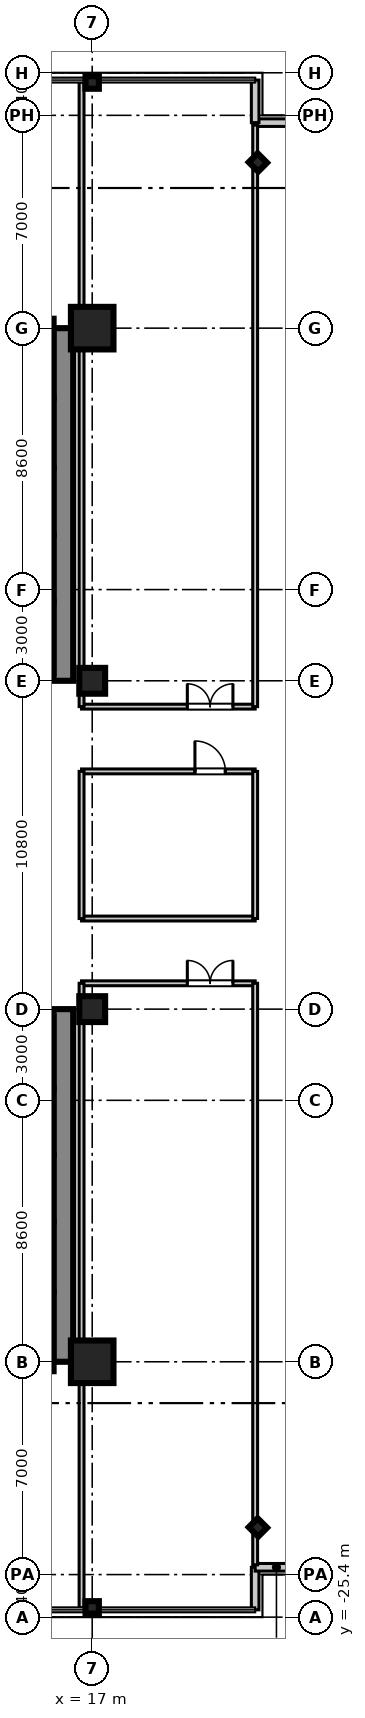
"""IFC4 building model, lengths in metres.
Left out: names, types, materials, properties, quantities, classifications, styles, units other than length and angle.
Written with IfcOpenShell. Run it as: python <this file> out.ifc"""

import sys

from ifc_helpers import new_model, si_unit, direction, frame, frame_2d, origin, origin_2d, place, context, subcontext, project, spatial, rectangle, i_section, extrude, source, transform, mapped, element, fill, save


model = new_model("IFC4")
c1 = context("Model", 3, precision=1e-05, world=origin(), true_north=direction((0.0, 1.0)))
c2 = subcontext(c1, "Body", "Model", "MODEL_VIEW")
j1 = project(units=[si_unit("LENGTHUNIT", "METRE"), si_unit("PLANEANGLEUNIT", "RADIAN")], contexts=[c1])
p1 = place(None, origin())
s1 = spatial("IfcSite", under=j1, at=p1, CompositionType="ELEMENT")
p2 = place(p1, origin())
s2 = spatial("IfcBuilding", under=s1, at=p2, CompositionType="ELEMENT")
p3 = place(p2, frame((0.0, 0.0, 32.4)))
s3 = spatial("IfcBuildingStorey", under=s2, at=p3, CompositionType="ELEMENT", Elevation=32.4)
m1 = source(origin(), c2, "Body", "SweptSolid", [
    extrude(rectangle(XDim=1.4, YDim=1.4, at=origin_2d()), origin(), (0.0, 0.0, 1.0), 3.605),
])
p4 = place(p3, frame((17.0, -17.0, 0.0), z_axis=(0.0, 0.0, 1.0), x_axis=(1.0, 0.0, 0.0)))
e1 = element("IfcColumn", 1, at=p4, inside=s3, PredefinedType="COLUMN", context=c2, shape_type="MappedRepresentation", body=[
    mapped(m1, transform((0.0, 0.0, 0.0), scale=1.0)),
])
m2 = source(origin(), c2, "Body", "SweptSolid", [
    extrude(rectangle(XDim=0.85, YDim=0.85, at=origin_2d()), origin(), (0.0, 0.0, 1.0), 3.605),
])
for number, where, z_axis, x_axis in (
    (2, (17.0, -5.4, 0.0), (0.0, 0.0, 1.0), (1.0, 0.0, 0.0)),
    (3, (17.0, 5.4, 0.0), (0.0, 0.0, 1.0), (1.0, 0.0, 0.0)),
):
    element("IfcColumn", number, at=place(p3, frame(where, z_axis=z_axis, x_axis=x_axis)), inside=s3, PredefinedType="PILASTER", context=c2, shape_type="MappedRepresentation", body=[
        mapped(m2, transform((0.0, 0.0, 0.0), scale=1.0)),
    ])
p5 = place(p3, frame((17.0, 17.0, 0.0), z_axis=(0.0, 0.0, 1.0), x_axis=(1.0, 0.0, 0.0)))
e4 = element("IfcColumn", 4, at=p5, inside=s3, PredefinedType="COLUMN", context=c2, shape_type="MappedRepresentation", body=[
    mapped(m1, transform((0.0, 0.0, 0.0), scale=1.0)),
])
m3 = source(origin(), c2, "Body", "SweptSolid", [
    extrude(i_section(OverallWidth=0.412, OverallDepth=0.438, WebThickness=0.023, FlangeThickness=0.036, at=origin_2d()), origin(), (0.0, 0.0, 1.0), 3.605),
])
for number, where, z_axis, x_axis in (
    (5, (17.0, -25.08, 0.0), (0.0, 0.0, 1.0), (0.0, 1.0, 0.0)),
    (6, (17.0, 25.08, 0.0), (0.0, 0.0, 1.0), (0.0, 1.0, 0.0)),
    (7, (22.45, -22.45, 0.0), (0.0, 0.0, 1.0), (0.707, 0.707, 0.0)),
    (8, (22.45, 22.45, 0.0), (0.0, 0.0, 1.0), (0.707, 0.707, 0.0)),
):
    element("IfcColumn", number, at=place(p3, frame(where, z_axis=z_axis, x_axis=x_axis)), inside=s3, PredefinedType="COLUMN", context=c2, shape_type="MappedRepresentation", body=[
        mapped(m3, transform((0.0, 0.0, 0.0), scale=1.0)),
    ])
m4 = source(origin(), c2, "Body", "SweptSolid", [
    extrude(rectangle(XDim=11.6, YDim=0.65, at=frame_2d((5.8, 0.0))), origin(), (0.0, 0.0, 1.0), 3.37),
])
for number, where, z_axis, x_axis in (
    (9, (16.05, 5.4, 0.0), (0.0, 0.0, 1.0), (0.0, 1.0, 0.0)),
    (10, (16.05, -17.0, 0.0), (0.0, 0.0, 1.0), (0.0, 1.0, 0.0)),
):
    element("IfcWall", number, at=place(p3, frame(where, z_axis=z_axis, x_axis=x_axis)), inside=s3, PredefinedType="SHEAR", context=c2, shape_type="MappedRepresentation", body=[
        mapped(m4, transform((0.0, 0.0, 0.0), scale=1.0)),
    ])
m5 = source(origin(), c2, "Body", "SweptSolid", [
    extrude(rectangle(XDim=2.36, YDim=0.22, at=frame_2d((1.18, 0.0))), origin(), (0.0, 0.0, 1.0), 3.37),
])
p6 = place(p3, frame((15.62, 5.64, 0.0), z_axis=(0.0, 0.0, 1.0), x_axis=(0.0, 1.0, 0.0)))
e11 = element("IfcWall", 11, at=p6, inside=s3, PredefinedType="SHEAR", context=c2, shape_type="MappedRepresentation", body=[
    mapped(m5, transform((0.0, 0.0, 0.0), scale=1.0)),
])
m6 = source(origin(), c2, "Body", "SweptSolid", [
    extrude(rectangle(XDim=2.2, YDim=0.22, at=frame_2d((1.1, 0.0))), origin(), (0.0, 0.0, 1.0), 3.37),
])
for number, where, z_axis, x_axis in (
    (12, (15.62, 8.0, 0.0), (0.0, 0.0, 1.0), (0.0, 1.0, 0.0)),
    (13, (15.62, 10.2, 0.0), (0.0, 0.0, 1.0), (0.0, 1.0, 0.0)),
):
    element("IfcWall", number, at=place(p3, frame(where, z_axis=z_axis, x_axis=x_axis)), inside=s3, PredefinedType="SHEAR", context=c2, shape_type="MappedRepresentation", body=[
        mapped(m6, transform((0.0, 0.0, 0.0), scale=1.0)),
    ])
m7 = source(origin(), c2, "Body", "SweptSolid", [
    extrude(rectangle(XDim=2.3, YDim=0.22, at=frame_2d((1.15, 0.0))), origin(), (0.0, 0.0, 1.0), 3.37),
])
p7 = place(p3, frame((15.62, 12.4, 0.0), z_axis=(0.0, 0.0, 1.0), x_axis=(0.0, 1.0, 0.0)))
e14 = element("IfcWall", 14, at=p7, inside=s3, PredefinedType="SHEAR", context=c2, shape_type="MappedRepresentation", body=[
    mapped(m7, transform((0.0, 0.0, 0.0), scale=1.0)),
])
p8 = place(p3, frame((15.62, -8.0, 0.0), z_axis=(0.0, 0.0, 1.0), x_axis=(0.0, 1.0, 0.0)))
e15 = element("IfcWall", 15, at=p8, inside=s3, PredefinedType="SHEAR", context=c2, shape_type="MappedRepresentation", body=[
    mapped(m5, transform((0.0, 0.0, 0.0), scale=1.0)),
])
for number, where, z_axis, x_axis in (
    (16, (15.62, -10.2, 0.0), (0.0, 0.0, 1.0), (0.0, 1.0, 0.0)),
    (17, (15.62, -12.4, 0.0), (0.0, 0.0, 1.0), (0.0, 1.0, 0.0)),
):
    element("IfcWall", number, at=place(p3, frame(where, z_axis=z_axis, x_axis=x_axis)), inside=s3, PredefinedType="SHEAR", context=c2, shape_type="MappedRepresentation", body=[
        mapped(m6, transform((0.0, 0.0, 0.0), scale=1.0)),
    ])
p9 = place(p3, frame((15.62, -14.7, 0.0), z_axis=(0.0, 0.0, 1.0), x_axis=(0.0, 1.0, 0.0)))
e18 = element("IfcWall", 18, at=p9, inside=s3, PredefinedType="SHEAR", context=c2, shape_type="MappedRepresentation", body=[
    mapped(m7, transform((0.0, 0.0, 0.0), scale=1.0)),
])
m8 = source(origin(), c2, "Body", "SweptSolid", [
    extrude(rectangle(XDim=2.61, YDim=0.22, at=frame_2d((1.305, 0.0))), origin(), (0.0, 0.0, 1.0), 3.37),
])
for number, where, z_axis, x_axis in (
    (19, (15.62, 14.7, 0.0), (0.0, 0.0, 1.0), (0.0, 1.0, 0.0)),
    (20, (15.62, -17.31, 0.0), (0.0, 0.0, 1.0), (0.0, 1.0, 0.0)),
):
    element("IfcWall", number, at=place(p3, frame(where, z_axis=z_axis, x_axis=x_axis)), inside=s3, PredefinedType="SHEAR", context=c2, shape_type="MappedRepresentation", body=[
        mapped(m8, transform((0.0, 0.0, 0.0), scale=1.0)),
    ])
m9 = source(origin(), c2, "Body", "SweptSolid", [
    extrude(rectangle(XDim=1.4, YDim=0.25, at=frame_2d((0.7, 0.0))), origin(), (0.0, 0.0, 1.0), 3.37),
])
for number, where, z_axis, x_axis in (
    (21, (22.36, -25.16, 0.0), (0.0, 0.0, 1.0), (0.0, 1.0, 0.0)),
    (22, (22.36, -23.76, 0.0), (0.0, 0.0, 1.0), (1.0, 0.0, 0.0)),
    (23, (22.36, 23.76, 0.0), (0.0, 0.0, 1.0), (1.0, 0.0, 0.0)),
    (24, (22.36, 23.76, 0.0), (0.0, 0.0, 1.0), (0.0, 1.0, 0.0)),
):
    element("IfcWall", number, at=place(p3, frame(where, z_axis=z_axis, x_axis=x_axis)), inside=s3, PredefinedType="STANDARD", context=c2, shape_type="MappedRepresentation", body=[
        mapped(m9, transform((0.0, 0.0, 0.0), scale=1.0)),
    ])
m10 = source(origin(), c2, "Body", "SweptSolid", [
    extrude(rectangle(XDim=5.71, YDim=0.16, at=frame_2d((2.855, 0.0))), origin(), (0.0, 0.0, 1.0), 2.71),
])
p10 = place(p3, frame((16.65, 4.55, 0.0), z_axis=(0.0, 0.0, 1.0), x_axis=(1.0, 0.0, 0.0)))
e25 = element("IfcWall", 25, at=p10, inside=s3, PredefinedType="PARTITIONING", context=c2, shape_type="MappedRepresentation", body=[
    mapped(m10, transform((0.0, 0.0, 0.0), scale=1.0)),
])
p11 = place(p10, frame((3.479, 0.0, 0.0)))
e26 = element("IfcOpeningElement", 26, at=p11, cuts=e25, PredefinedType="OPENING", context=c2, shape_type="SweptSolid", body=[
    extrude(rectangle(XDim=1.5, YDim=2.15, at=frame_2d((0.75, 1.075))), frame((0.0, 0.09, 0.0), z_axis=(0.0, -1.0, 0.0), x_axis=(1.0, 0.0, 0.0)), (0.0, 0.0, 1.0), 0.18),
])
m11 = source(origin(), c2, "Body", "SweptSolid", [
    extrude(rectangle(XDim=20.55, YDim=0.16, at=frame_2d((10.275, 0.0))), origin(), (0.0, 0.0, 1.0), 2.71),
])
p12 = place(p3, frame((16.65, 4.55, 0.0), z_axis=(0.0, 0.0, 1.0), x_axis=(0.0, 1.0, 0.0)))
e27 = element("IfcWall", 27, at=p12, inside=s3, PredefinedType="PARTITIONING", context=c2, shape_type="MappedRepresentation", body=[
    mapped(m11, transform((0.0, 0.0, 0.0), scale=1.0)),
])
m12 = source(origin(), c2, "Body", "SweptSolid", [
    extrude(rectangle(XDim=19.13, YDim=0.16, at=frame_2d((9.565, 0.0))), origin(), (0.0, 0.0, 1.0), 2.71),
])
p13 = place(p3, frame((22.36, 4.55, 0.0), z_axis=(0.0, 0.0, 1.0), x_axis=(0.0, 1.0, 0.0)))
e28 = element("IfcWall", 28, at=p13, inside=s3, PredefinedType="PARTITIONING", context=c2, shape_type="MappedRepresentation", body=[
    mapped(m12, transform((0.0, 0.0, 0.0), scale=1.0)),
])
p14 = place(p3, frame((16.65, -4.55, 0.0), z_axis=(0.0, 0.0, 1.0), x_axis=(1.0, 0.0, 0.0)))
e29 = element("IfcWall", 29, at=p14, inside=s3, PredefinedType="PARTITIONING", context=c2, shape_type="MappedRepresentation", body=[
    mapped(m10, transform((0.0, 0.0, 0.0), scale=1.0)),
])
p15 = place(p14, frame((3.479, 0.0, 0.0)))
e30 = element("IfcOpeningElement", 30, at=p15, cuts=e29, PredefinedType="OPENING", context=c2, shape_type="SweptSolid", body=[
    extrude(rectangle(XDim=1.5, YDim=2.15, at=frame_2d((0.75, 1.075))), frame((0.0, 0.09, 0.0), z_axis=(0.0, -1.0, 0.0), x_axis=(1.0, 0.0, 0.0)), (0.0, 0.0, 1.0), 0.18),
])
p16 = place(p3, frame((16.65, -25.1, 0.0), z_axis=(0.0, 0.0, 1.0), x_axis=(0.0, 1.0, 0.0)))
e31 = element("IfcWall", 31, at=p16, inside=s3, PredefinedType="PARTITIONING", context=c2, shape_type="MappedRepresentation", body=[
    mapped(m11, transform((0.0, 0.0, 0.0), scale=1.0)),
])
p17 = place(p3, frame((22.36, -23.68, 0.0), z_axis=(0.0, 0.0, 1.0), x_axis=(0.0, 1.0, 0.0)))
e32 = element("IfcWall", 32, at=p17, inside=s3, PredefinedType="PARTITIONING", context=c2, shape_type="MappedRepresentation", body=[
    mapped(m12, transform((0.0, 0.0, 0.0), scale=1.0)),
])
p18 = place(p3, frame((16.65, -2.42, 0.0), z_axis=(0.0, 0.0, 1.0), x_axis=(1.0, 0.0, 0.0)))
e33 = element("IfcWall", 33, at=p18, inside=s3, PredefinedType="PARTITIONING", context=c2, shape_type="MappedRepresentation", body=[
    mapped(m10, transform((0.0, 0.0, 0.0), scale=1.0)),
])
p19 = place(p3, frame((16.65, 2.42, 0.0), z_axis=(0.0, 0.0, 1.0), x_axis=(1.0, 0.0, 0.0)))
e34 = element("IfcWall", 34, at=p19, inside=s3, PredefinedType="PARTITIONING", context=c2, shape_type="MappedRepresentation", body=[
    mapped(m10, transform((0.0, 0.0, 0.0), scale=1.0)),
])
p20 = place(p19, frame((3.729, 0.0, 0.0)))
e35 = element("IfcOpeningElement", 35, at=p20, cuts=e34, PredefinedType="OPENING", context=c2, shape_type="SweptSolid", body=[
    extrude(rectangle(XDim=1.0, YDim=2.1, at=frame_2d((0.5, 1.05))), frame((0.0, 0.09, 0.0), z_axis=(0.0, -1.0, 0.0), x_axis=(1.0, 0.0, 0.0)), (0.0, 0.0, 1.0), 0.18),
])
m13 = source(origin(), c2, "Body", "SweptSolid", [
    extrude(rectangle(XDim=4.84, YDim=0.16, at=frame_2d((2.42, 0.0))), origin(), (0.0, 0.0, 1.0), 2.71),
])
for number, where, z_axis, x_axis in (
    (36, (16.65, -2.42, 0.0), (0.0, 0.0, 1.0), (0.0, 1.0, 0.0)),
    (37, (22.36, -2.42, 0.0), (0.0, 0.0, 1.0), (0.0, 1.0, 0.0)),
):
    element("IfcWall", number, at=place(p3, frame(where, z_axis=z_axis, x_axis=x_axis)), inside=s3, PredefinedType="PARTITIONING", context=c2, shape_type="MappedRepresentation", body=[
        mapped(m13, transform((0.0, 0.0, 0.0), scale=1.0)),
    ])
m14 = source(origin(), c2, "Body", "SweptSolid", [
    extrude(rectangle(XDim=1.5, YDim=2.15, at=frame_2d((0.75, 1.075))), frame((0.0, 0.025, 0.0), z_axis=(0.0, -1.0, 0.0), x_axis=(1.0, 0.0, 0.0)), (0.0, 0.0, 1.0), 0.05),
])
p21 = place(p11, origin())
e38 = element("IfcDoor", 38, at=p21, inside=s3, OperationType="DOUBLE_DOOR_SINGLE_SWING", PredefinedType="DOOR", context=c2, shape_type="MappedRepresentation", body=[
    mapped(m14, transform((0.0, 0.0, 0.0), scale=1.0)),
])
fill(e26, e38)
p22 = place(p15, frame((1.5, 0.0, 0.0), z_axis=(0.0, 0.0, 1.0), x_axis=(-1.0, 0.0, 0.0)))
e39 = element("IfcDoor", 39, at=p22, inside=s3, OperationType="DOUBLE_DOOR_SINGLE_SWING", PredefinedType="DOOR", context=c2, shape_type="MappedRepresentation", body=[
    mapped(m14, transform((0.0, 0.0, 0.0), scale=1.0)),
])
fill(e30, e39)
m15 = source(origin(), c2, "Body", "SweptSolid", [
    extrude(rectangle(XDim=1.0, YDim=2.1, at=frame_2d((0.5, 1.05))), frame((0.0, 0.025, 0.0), z_axis=(0.0, -1.0, 0.0), x_axis=(1.0, 0.0, 0.0)), (0.0, 0.0, 1.0), 0.05),
])
p23 = place(p20, frame((1.0, 0.0, 0.0), z_axis=(0.0, 0.0, 1.0), x_axis=(-1.0, 0.0, 0.0)))
e40 = element("IfcDoor", 40, at=p23, inside=s3, OperationType="SINGLE_SWING_LEFT", PredefinedType="DOOR", context=c2, shape_type="MappedRepresentation", body=[
    mapped(m15, transform((0.0, 0.0, 0.0), scale=1.0)),
])
fill(e35, e40)
save(model, sys.argv[1])
